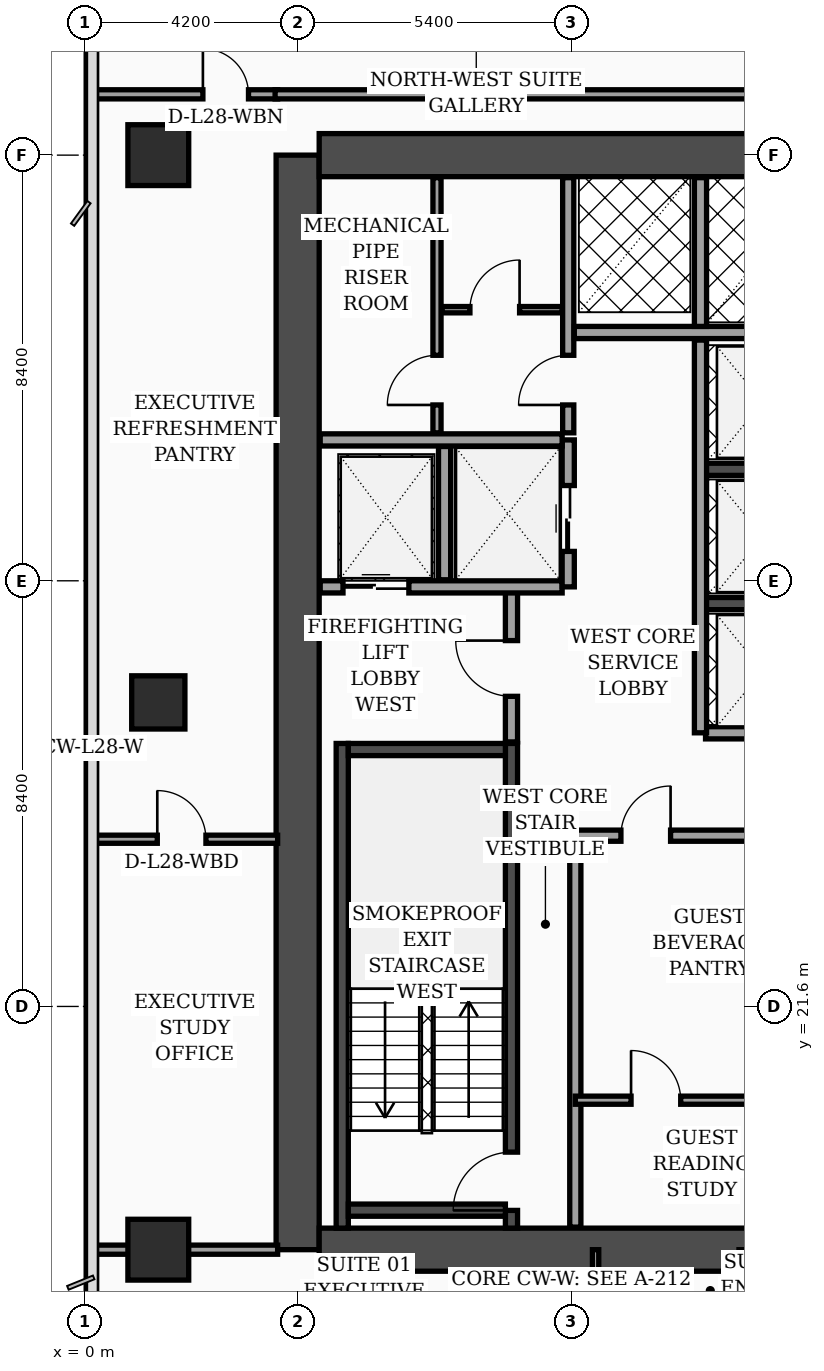
"""IFC4 building model, lengths in metres.
Left out: names, types, materials, properties, quantities, classifications, styles, units other than length and angle.
Written with IfcOpenShell. Run it as: python <this file> out.ifc"""

import sys

from ifc_helpers import new_model, si_unit, direction, frame, frame_2d, origin, origin_2d, place, context, subcontext, project, spatial, rectangle, extrude, element, fill, save


model = new_model("IFC4")
c1 = context("Model", 3, precision=1e-05, world=origin(), true_north=direction((0.0, 1.0)))
c2 = subcontext(c1, "Body", "Model", "MODEL_VIEW")
j1 = project(units=[si_unit("LENGTHUNIT", "METRE"), si_unit("PLANEANGLEUNIT", "RADIAN")], contexts=[c1])
p1 = place(None, origin())
s1 = spatial("IfcSite", under=j1, at=p1, CompositionType="ELEMENT")
p2 = place(p1, origin())
s2 = spatial("IfcBuilding", under=s1, at=p2, CompositionType="ELEMENT")
p3 = place(p2, frame((0.0, 0.0, 116.4)))
s3 = spatial("IfcBuildingStorey", under=s2, at=p3, CompositionType="ELEMENT", Elevation=116.4)
p4 = place(p3, frame((4.2, 16.8, 0.0), z_axis=(0.0, 0.0, 1.0), x_axis=(0.0, 1.0, 0.0)))
e1 = element("IfcWall", 1, at=p4, inside=s3, PredefinedType="SHEAR", context=c2, shape_type="SweptSolid", body=[
    extrude(rectangle(XDim=21.6, YDim=0.85, at=frame_2d((10.8, 0.0))), origin(), (0.0, 0.0, 1.0), 3.56),
])
for number, where, z_axis, x_axis in (
    (2, (4.625, 38.4, 0.0), (0.0, 0.0, 1.0), (1.0, 0.0, 0.0)),
    (3, (4.625, 16.8, 0.0), (0.0, 0.0, 1.0), (1.0, 0.0, 0.0)),
):
    element("IfcWall", number, at=place(p3, frame(where, z_axis=z_axis, x_axis=x_axis)), inside=s3, PredefinedType="SHEAR", context=c2, shape_type="SweptSolid", body=[
        extrude(rectangle(XDim=9.95, YDim=0.85, at=frame_2d((4.975, 0.0))), origin(), (0.0, 0.0, 1.0), 3.56),
    ])
p5 = place(p3, frame((5.08, 17.225, 0.0), z_axis=(0.0, 0.0, 1.0), x_axis=(0.0, 1.0, 0.0)))
e4 = element("IfcWall", 4, at=p5, inside=s3, PredefinedType="SOLIDWALL", context=c2, shape_type="SweptSolid", body=[
    extrude(rectangle(XDim=9.565, YDim=0.24, at=frame_2d((4.782, 0.0))), origin(), (0.0, 0.0, 1.0), 3.56),
])
p6 = place(p3, frame((8.42, 17.225, 0.0), z_axis=(0.0, 0.0, 1.0), x_axis=(0.0, 1.0, 0.0)))
e5 = element("IfcWall", 5, at=p6, inside=s3, PredefinedType="SOLIDWALL", context=c2, shape_type="SweptSolid", body=[
    extrude(rectangle(XDim=9.565, YDim=0.24, at=frame_2d((4.782, 0.0))), origin(), (0.0, 0.0, 1.0), 3.56),
])
p7 = place(p6, frame((0.35, 0.0, 0.0)))
e6 = element("IfcOpeningElement", 6, at=p7, cuts=e5, PredefinedType="OPENING", context=c2, shape_type="SweptSolid", body=[
    extrude(rectangle(XDim=1.15, YDim=2.2, at=frame_2d((0.575, 1.1))), frame((0.0, 0.13, 0.0), z_axis=(0.0, -1.0, 0.0), x_axis=(1.0, 0.0, 0.0)), (0.0, 0.0, 1.0), 0.26),
])
for number, where, z_axis, x_axis in (
    (7, (5.2, 17.58, 0.0), (0.0, 0.0, 1.0), (1.0, 0.0, 0.0)),
    (8, (5.2, 26.67, 0.0), (0.0, 0.0, 1.0), (1.0, 0.0, 0.0)),
):
    element("IfcWall", number, at=place(p3, frame(where, z_axis=z_axis, x_axis=x_axis)), inside=s3, PredefinedType="SOLIDWALL", context=c2, shape_type="SweptSolid", body=[
        extrude(rectangle(XDim=3.1, YDim=0.24, at=frame_2d((1.55, 0.0))), origin(), (0.0, 0.0, 1.0), 3.56),
    ])
for number, where, z_axis, x_axis in (
    (9, (12.18, 29.55, 0.0), (0.0, 0.0, 1.0), (1.0, 0.0, 0.0)),
    (10, (12.18, 32.2, 0.0), (0.0, 0.0, 1.0), (1.0, 0.0, 0.0)),
):
    element("IfcWall", number, at=place(p3, frame(where, z_axis=z_axis, x_axis=x_axis)), inside=s3, PredefinedType="SOLIDWALL", context=c2, shape_type="SweptSolid", body=[
        extrude(rectangle(XDim=2.395, YDim=0.24, at=frame_2d((1.198, 0.0))), origin(), (0.0, 0.0, 1.0), 3.56),
    ])
p8 = place(p3, frame((1.45, 16.8, 0.0), z_axis=(0.0, 0.0, 1.0), x_axis=(1.0, 0.0, 0.0)))
e11 = element("IfcColumn", 11, at=p8, inside=s3, PredefinedType="COLUMN", context=c2, shape_type="SweptSolid", body=[
    extrude(rectangle(XDim=1.2, YDim=1.2, at=origin_2d()), origin(), (0.0, 0.0, 1.0), 3.56),
])
p9 = place(p3, frame((1.45, 27.6, 0.0), z_axis=(0.0, 0.0, 1.0), x_axis=(1.0, 0.0, 0.0)))
e12 = element("IfcColumn", 12, at=p9, inside=s3, PredefinedType="COLUMN", context=c2, shape_type="SweptSolid", body=[
    extrude(rectangle(XDim=1.05, YDim=1.05, at=origin_2d()), origin(), (0.0, 0.0, 1.0), 3.56),
])
p10 = place(p3, frame((1.45, 38.4, 0.0), z_axis=(0.0, 0.0, 1.0), x_axis=(1.0, 0.0, 0.0)))
e13 = element("IfcColumn", 13, at=p10, inside=s3, PredefinedType="COLUMN", context=c2, shape_type="SweptSolid", body=[
    extrude(rectangle(XDim=1.2, YDim=1.2, at=origin_2d()), origin(), (0.0, 0.0, 1.0), 3.56),
])
p11 = place(p3, frame((8.42, 26.82, 0.0), z_axis=(0.0, 0.0, 1.0), x_axis=(0.0, 1.0, 0.0)))
e14 = element("IfcWall", 14, at=p11, inside=s3, PredefinedType="SOLIDWALL", context=c2, shape_type="SweptSolid", body=[
    extrude(rectangle(XDim=3.0, YDim=0.24, at=frame_2d((1.5, 0.0))), origin(), (0.0, 0.0, 1.0), 3.56),
])
p12 = place(p11, frame((0.9, 0.0, 0.0)))
e15 = element("IfcOpeningElement", 15, at=p12, cuts=e14, PredefinedType="OPENING", context=c2, shape_type="SweptSolid", body=[
    extrude(rectangle(XDim=1.1, YDim=2.2, at=frame_2d((0.55, 1.1))), frame((0.0, 0.13, 0.0), z_axis=(0.0, -1.0, 0.0), x_axis=(1.0, 0.0, 0.0)), (0.0, 0.0, 1.0), 0.26),
])
p13 = place(p3, frame((4.645, 29.88, 0.0), z_axis=(0.0, 0.0, 1.0), x_axis=(1.0, 0.0, 0.0)))
e16 = element("IfcWall", 16, at=p13, inside=s3, PredefinedType="SOLIDWALL", context=c2, shape_type="SweptSolid", body=[
    extrude(rectangle(XDim=4.775, YDim=0.24, at=frame_2d((2.387, 0.0))), origin(), (0.0, 0.0, 1.0), 3.56),
])
p14 = place(p13, frame((0.45, 0.0, 0.0)))
e17 = element("IfcOpeningElement", 17, at=p14, cuts=e16, PredefinedType="OPENING", context=c2, shape_type="SweptSolid", body=[
    extrude(rectangle(XDim=1.3, YDim=2.35, at=frame_2d((0.65, 1.175))), frame((0.0, 0.13, 0.0), z_axis=(0.0, -1.0, 0.0), x_axis=(1.0, 0.0, 0.0)), (0.0, 0.0, 1.0), 0.26),
])
p15 = place(p3, frame((7.1, 30.02, 0.0), z_axis=(0.0, 0.0, 1.0), x_axis=(0.0, 1.0, 0.0)))
e18 = element("IfcWall", 18, at=p15, inside=s3, PredefinedType="SOLIDWALL", context=c2, shape_type="SweptSolid", body=[
    extrude(rectangle(XDim=2.63, YDim=0.24, at=frame_2d((1.315, 0.0))), origin(), (0.0, 0.0, 1.0), 3.56),
])
p16 = place(p3, frame((9.54, 29.88, 0.0), z_axis=(0.0, 0.0, 1.0), x_axis=(0.0, 1.0, 0.0)))
e19 = element("IfcWall", 19, at=p16, inside=s3, PredefinedType="SOLIDWALL", context=c2, shape_type="SweptSolid", body=[
    extrude(rectangle(XDim=2.9, YDim=0.24, at=frame_2d((1.45, 0.0))), origin(), (0.0, 0.0, 1.0), 3.56),
])
p17 = place(p16, frame((0.7, 0.0, 0.0)))
e20 = element("IfcOpeningElement", 20, at=p17, cuts=e19, PredefinedType="OPENING", context=c2, shape_type="SweptSolid", body=[
    extrude(rectangle(XDim=1.3, YDim=2.35, at=frame_2d((0.65, 1.175))), frame((0.0, 0.13, 0.0), z_axis=(0.0, -1.0, 0.0), x_axis=(1.0, 0.0, 0.0)), (0.0, 0.0, 1.0), 0.26),
])
p18 = place(p3, frame((4.645, 32.78, 0.0), z_axis=(0.0, 0.0, 1.0), x_axis=(1.0, 0.0, 0.0)))
e21 = element("IfcWall", 21, at=p18, inside=s3, PredefinedType="SOLIDWALL", context=c2, shape_type="SweptSolid", body=[
    extrude(rectangle(XDim=4.775, YDim=0.24, at=frame_2d((2.387, 0.0))), origin(), (0.0, 0.0, 1.0), 3.19),
])
p19 = place(p3, frame((9.68, 17.245, 0.0), z_axis=(0.0, 0.0, 1.0), x_axis=(0.0, 1.0, 0.0)))
e22 = element("IfcWall", 22, at=p19, inside=s3, PredefinedType="SOLIDWALL", context=c2, shape_type="SweptSolid", body=[
    extrude(rectangle(XDim=7.755, YDim=0.22, at=frame_2d((3.877, 0.0))), origin(), (0.0, 0.0, 1.0), 3.56),
])
p20 = place(p3, frame((6.95, 32.92, 0.0), z_axis=(0.0, 0.0, 1.0), x_axis=(0.0, 1.0, 0.0)))
e23 = element("IfcWall", 23, at=p20, inside=s3, PredefinedType="PARTITIONING", context=c2, shape_type="SweptSolid", body=[
    extrude(rectangle(XDim=5.035, YDim=0.16, at=frame_2d((2.518, 0.0))), origin(), (0.0, 0.0, 1.0), 3.56),
])
p21 = place(p20, frame((0.55, 0.0, 0.0)))
e24 = element("IfcOpeningElement", 24, at=p21, cuts=e23, PredefinedType="OPENING", context=c2, shape_type="SweptSolid", body=[
    extrude(rectangle(XDim=0.98, YDim=2.15, at=frame_2d((0.49, 1.075))), frame((0.0, 0.09, 0.0), z_axis=(0.0, -1.0, 0.0), x_axis=(1.0, 0.0, 0.0)), (0.0, 0.0, 1.0), 0.18),
])
p22 = place(p3, frame((7.05, 35.35, 0.0), z_axis=(0.0, 0.0, 1.0), x_axis=(1.0, 0.0, 0.0)))
e25 = element("IfcWall", 25, at=p22, inside=s3, PredefinedType="PARTITIONING", context=c2, shape_type="SweptSolid", body=[
    extrude(rectangle(XDim=2.37, YDim=0.125, at=frame_2d((1.185, 0.0))), origin(), (0.0, 0.0, 1.0), 3.56),
])
p23 = place(p22, frame((0.55, 0.0, 0.0)))
e26 = element("IfcOpeningElement", 26, at=p23, cuts=e25, PredefinedType="OPENING", context=c2, shape_type="SweptSolid", body=[
    extrude(rectangle(XDim=0.98, YDim=2.15, at=frame_2d((0.49, 1.075))), frame((0.0, 0.073, 0.0), z_axis=(0.0, -1.0, 0.0), x_axis=(1.0, 0.0, 0.0)), (0.0, 0.0, 1.0), 0.145),
])
p24 = place(p3, frame((9.54, 32.92, 0.0), z_axis=(0.0, 0.0, 1.0), x_axis=(0.0, 1.0, 0.0)))
e27 = element("IfcWall", 27, at=p24, inside=s3, PredefinedType="SOLIDWALL", context=c2, shape_type="SweptSolid", body=[
    extrude(rectangle(XDim=5.035, YDim=0.22, at=frame_2d((2.518, 0.0))), origin(), (0.0, 0.0, 1.0), 3.56),
])
p25 = place(p24, frame((0.55, 0.0, 0.0)))
e28 = element("IfcOpeningElement", 28, at=p25, cuts=e27, PredefinedType="OPENING", context=c2, shape_type="SweptSolid", body=[
    extrude(rectangle(XDim=0.98, YDim=2.15, at=frame_2d((0.49, 1.075))), frame((0.0, 0.12, 0.0), z_axis=(0.0, -1.0, 0.0), x_axis=(1.0, 0.0, 0.0)), (0.0, 0.0, 1.0), 0.24),
])
p26 = place(p3, frame((9.68, 19.75, 0.0), z_axis=(0.0, 0.0, 1.0), x_axis=(1.0, 0.0, 0.0)))
e29 = element("IfcWall", 29, at=p26, inside=s3, PredefinedType="PARTITIONING", context=c2, shape_type="SweptSolid", body=[
    extrude(rectangle(XDim=4.875, YDim=0.16, at=frame_2d((2.438, 0.0))), origin(), (0.0, 0.0, 1.0), 3.56),
])
p27 = place(p26, frame((1.1, 0.0, 0.0)))
e30 = element("IfcOpeningElement", 30, at=p27, cuts=e29, PredefinedType="OPENING", context=c2, shape_type="SweptSolid", body=[
    extrude(rectangle(XDim=0.98, YDim=2.15, at=frame_2d((0.49, 1.075))), frame((0.0, 0.09, 0.0), z_axis=(0.0, -1.0, 0.0), x_axis=(1.0, 0.0, 0.0)), (0.0, 0.0, 1.0), 0.18),
])
p28 = place(p3, frame((9.68, 24.97, 0.0), z_axis=(0.0, 0.0, 1.0), x_axis=(1.0, 0.0, 0.0)))
e31 = element("IfcWall", 31, at=p28, inside=s3, PredefinedType="SOLIDWALL", context=c2, shape_type="SweptSolid", body=[
    extrude(rectangle(XDim=4.875, YDim=0.22, at=frame_2d((2.438, 0.0))), origin(), (0.0, 0.0, 1.0), 2.84),
])
p29 = place(p28, frame((0.9, 0.0, 0.0)))
e32 = element("IfcOpeningElement", 32, at=p29, cuts=e31, PredefinedType="OPENING", context=c2, shape_type="SweptSolid", body=[
    extrude(rectangle(XDim=0.98, YDim=2.15, at=frame_2d((0.49, 1.075))), frame((0.0, 0.12, 0.0), z_axis=(0.0, -1.0, 0.0), x_axis=(1.0, 0.0, 0.0)), (0.0, 0.0, 1.0), 0.24),
])
p30 = place(p3, frame((12.25, 27.0, 0.0), z_axis=(0.0, 0.0, 1.0), x_axis=(1.0, 0.0, 0.0)))
e33 = element("IfcWall", 33, at=p30, inside=s3, PredefinedType="SOLIDWALL", context=c2, shape_type="SweptSolid", body=[
    extrude(rectangle(XDim=2.305, YDim=0.24, at=frame_2d((1.152, 0.0))), origin(), (0.0, 0.0, 1.0), 3.56),
])
p31 = place(p3, frame((12.15, 27.0, 0.0), z_axis=(0.0, 0.0, 1.0), x_axis=(0.0, 1.0, 0.0)))
e34 = element("IfcWall", 34, at=p31, inside=s3, PredefinedType="SOLIDWALL", context=c2, shape_type="SweptSolid", body=[
    extrude(rectangle(XDim=7.75, YDim=0.24, at=frame_2d((3.875, 0.0))), origin(), (0.0, 0.0, 1.0), 3.56),
])
p32 = place(p3, frame((9.66, 34.9, 0.0), z_axis=(0.0, 0.0, 1.0), x_axis=(1.0, 0.0, 0.0)))
e35 = element("IfcWall", 35, at=p32, inside=s3, PredefinedType="SOLIDWALL", context=c2, shape_type="SweptSolid", body=[
    extrude(rectangle(XDim=4.895, YDim=0.24, at=frame_2d((2.448, 0.0))), origin(), (0.0, 0.0, 1.0), 3.56),
])
p33 = place(p3, frame((12.15, 35.02, 0.0), z_axis=(0.0, 0.0, 1.0), x_axis=(0.0, 1.0, 0.0)))
e36 = element("IfcWall", 36, at=p33, inside=s3, PredefinedType="SOLIDWALL", context=c2, shape_type="SweptSolid", body=[
    extrude(rectangle(XDim=2.935, YDim=0.24, at=frame_2d((1.468, 0.0))), origin(), (0.0, 0.0, 1.0), 3.56),
])
p34 = place(p3, frame((0.08, 24.9, 0.0), z_axis=(0.0, 0.0, 1.0), x_axis=(1.0, 0.0, 0.0)))
e37 = element("IfcWall", 37, at=p34, inside=s3, PredefinedType="PARTITIONING", context=c2, shape_type="SweptSolid", body=[
    extrude(rectangle(XDim=3.725, YDim=0.16, at=frame_2d((1.862, 0.0))), origin(), (0.0, 0.0, 1.0), 3.04),
])
p35 = place(p34, frame((1.35, 0.0, 0.0)))
e38 = element("IfcOpeningElement", 38, at=p35, cuts=e37, PredefinedType="OPENING", context=c2, shape_type="SweptSolid", body=[
    extrude(rectangle(XDim=0.96, YDim=2.2, at=frame_2d((0.48, 1.1))), frame((0.0, 0.09, 0.0), z_axis=(0.0, -1.0, 0.0), x_axis=(1.0, 0.0, 0.0)), (0.0, 0.0, 1.0), 0.18),
])
p36 = place(p3, frame((0.08, 16.8, 0.0), z_axis=(0.0, 0.0, 1.0), x_axis=(1.0, 0.0, 0.0)))
e39 = element("IfcWall", 39, at=p36, inside=s3, PredefinedType="PARTITIONING", context=c2, shape_type="SweptSolid", body=[
    extrude(rectangle(XDim=3.725, YDim=0.18, at=frame_2d((1.862, 0.0))), origin(), (0.0, 0.0, 1.0), 2.84),
])
p37 = place(p3, frame((0.08, 39.6, 0.0), z_axis=(0.0, 0.0, 1.0), x_axis=(1.0, 0.0, 0.0)))
e40 = element("IfcWall", 40, at=p37, inside=s3, PredefinedType="PARTITIONING", context=c2, shape_type="SweptSolid", body=[
    extrude(rectangle(XDim=3.725, YDim=0.18, at=frame_2d((1.862, 0.0))), origin(), (0.0, 0.0, 1.0), 2.84),
])
p38 = place(p37, frame((2.25, 0.0, 0.0)))
e41 = element("IfcOpeningElement", 41, at=p38, cuts=e40, PredefinedType="OPENING", context=c2, shape_type="SweptSolid", body=[
    extrude(rectangle(XDim=0.9, YDim=2.15, at=frame_2d((0.45, 1.075))), frame((0.0, 0.1, 0.0), z_axis=(0.0, -1.0, 0.0), x_axis=(1.0, 0.0, 0.0)), (0.0, 0.0, 1.0), 0.2),
])
p39 = place(p3, frame((10.08, 14.55, 0.0), z_axis=(0.0, 0.0, 1.0), x_axis=(0.0, 1.0, 0.0)))
e42 = element("IfcWall", 42, at=p39, inside=s3, PredefinedType="PARTITIONING", context=c2, shape_type="SweptSolid", body=[
    extrude(rectangle(XDim=2.25, YDim=0.125, at=frame_2d((1.125, 0.0))), origin(), (0.0, 0.0, 1.0), 3.56),
])
p40 = place(p3, frame((13.0, 2.44, 0.0), z_axis=(0.0, 0.0, 1.0), x_axis=(0.0, 1.0, 0.0)))
e43 = element("IfcWall", 43, at=p40, inside=s3, PredefinedType="PARTITIONING", context=c2, shape_type="SweptSolid", body=[
    extrude(rectangle(XDim=14.36, YDim=0.18, at=frame_2d((7.18, 0.0))), origin(), (0.0, 0.0, 1.0), 2.84),
])
p41 = place(p40, frame((3.01, 0.0, 0.0)))
e44 = element("IfcOpeningElement", 44, at=p41, cuts=e43, PredefinedType="OPENING", context=c2, shape_type="SweptSolid", body=[
    extrude(rectangle(XDim=1.02, YDim=2.2, at=frame_2d((0.51, 1.1))), frame((0.0, 0.1, 0.0), z_axis=(0.0, -1.0, 0.0), x_axis=(1.0, 0.0, 0.0)), (0.0, 0.0, 1.0), 0.2),
])
p42 = place(p3, frame((3.755, 39.6, 0.0), z_axis=(0.0, 0.0, 1.0), x_axis=(1.0, 0.0, 0.0)))
e45 = element("IfcWall", 45, at=p42, inside=s3, PredefinedType="PARTITIONING", context=c2, shape_type="SweptSolid", body=[
    extrude(rectangle(XDim=11.395, YDim=0.18, at=frame_2d((5.698, 0.0))), origin(), (0.0, 0.0, 1.0), 2.84),
])
p43 = place(p12, origin())
e46 = element("IfcDoor", 46, at=p43, inside=s3, OperationType="SINGLE_SWING_RIGHT", PredefinedType="DOOR", context=c2, shape_type="SweptSolid", body=[
    extrude(rectangle(XDim=1.1, YDim=2.2, at=frame_2d((0.55, 1.1))), frame((0.0, 0.025, 0.0), z_axis=(0.0, -1.0, 0.0), x_axis=(1.0, 0.0, 0.0)), (0.0, 0.0, 1.0), 0.05),
])
fill(e15, e46)
p44 = place(p14, origin())
e47 = element("IfcDoor", 47, at=p44, inside=s3, OperationType="DOUBLE_DOOR_SLIDING", PredefinedType="DOOR", context=c2, shape_type="SweptSolid", body=[
    extrude(rectangle(XDim=1.3, YDim=2.35, at=frame_2d((0.65, 1.175))), frame((0.0, 0.025, 0.0), z_axis=(0.0, -1.0, 0.0), x_axis=(1.0, 0.0, 0.0)), (0.0, 0.0, 1.0), 0.05),
])
fill(e17, e47)
p45 = place(p17, origin())
e48 = element("IfcDoor", 48, at=p45, inside=s3, OperationType="DOUBLE_DOOR_SLIDING", PredefinedType="DOOR", context=c2, shape_type="SweptSolid", body=[
    extrude(rectangle(XDim=1.3, YDim=2.35, at=frame_2d((0.65, 1.175))), frame((0.0, 0.025, 0.0), z_axis=(0.0, -1.0, 0.0), x_axis=(1.0, 0.0, 0.0)), (0.0, 0.0, 1.0), 0.05),
])
fill(e20, e48)
p46 = place(p21, origin())
e49 = element("IfcDoor", 49, at=p46, inside=s3, OperationType="SINGLE_SWING_LEFT", PredefinedType="DOOR", context=c2, shape_type="SweptSolid", body=[
    extrude(rectangle(XDim=0.98, YDim=2.15, at=frame_2d((0.49, 1.075))), frame((0.0, 0.025, 0.0), z_axis=(0.0, -1.0, 0.0), x_axis=(1.0, 0.0, 0.0)), (0.0, 0.0, 1.0), 0.05),
])
fill(e24, e49)
p47 = place(p23, origin())
e50 = element("IfcDoor", 50, at=p47, inside=s3, OperationType="SINGLE_SWING_RIGHT", PredefinedType="DOOR", context=c2, shape_type="SweptSolid", body=[
    extrude(rectangle(XDim=0.98, YDim=2.15, at=frame_2d((0.49, 1.075))), frame((0.0, 0.025, 0.0), z_axis=(0.0, -1.0, 0.0), x_axis=(1.0, 0.0, 0.0)), (0.0, 0.0, 1.0), 0.05),
])
fill(e26, e50)
p48 = place(p25, origin())
e51 = element("IfcDoor", 51, at=p48, inside=s3, OperationType="SINGLE_SWING_LEFT", PredefinedType="DOOR", context=c2, shape_type="SweptSolid", body=[
    extrude(rectangle(XDim=0.98, YDim=2.15, at=frame_2d((0.49, 1.075))), frame((0.0, 0.025, 0.0), z_axis=(0.0, -1.0, 0.0), x_axis=(1.0, 0.0, 0.0)), (0.0, 0.0, 1.0), 0.05),
])
fill(e28, e51)
p49 = place(p27, origin())
e52 = element("IfcDoor", 52, at=p49, inside=s3, OperationType="SINGLE_SWING_LEFT", PredefinedType="DOOR", context=c2, shape_type="SweptSolid", body=[
    extrude(rectangle(XDim=0.98, YDim=2.15, at=frame_2d((0.49, 1.075))), frame((0.0, 0.025, 0.0), z_axis=(0.0, -1.0, 0.0), x_axis=(1.0, 0.0, 0.0)), (0.0, 0.0, 1.0), 0.05),
])
fill(e30, e52)
p50 = place(p29, origin())
e53 = element("IfcDoor", 53, at=p50, inside=s3, OperationType="SINGLE_SWING_RIGHT", PredefinedType="DOOR", context=c2, shape_type="SweptSolid", body=[
    extrude(rectangle(XDim=0.98, YDim=2.15, at=frame_2d((0.49, 1.075))), frame((0.0, 0.025, 0.0), z_axis=(0.0, -1.0, 0.0), x_axis=(1.0, 0.0, 0.0)), (0.0, 0.0, 1.0), 0.05),
])
fill(e32, e53)
p51 = place(p35, origin())
e54 = element("IfcDoor", 54, at=p51, inside=s3, OperationType="SINGLE_SWING_LEFT", PredefinedType="DOOR", context=c2, shape_type="SweptSolid", body=[
    extrude(rectangle(XDim=0.96, YDim=2.2, at=frame_2d((0.48, 1.1))), frame((0.0, 0.025, 0.0), z_axis=(0.0, -1.0, 0.0), x_axis=(1.0, 0.0, 0.0)), (0.0, 0.0, 1.0), 0.05),
])
fill(e38, e54)
p52 = place(p38, origin())
e55 = element("IfcDoor", 55, at=p52, inside=s3, OperationType="SINGLE_SWING_LEFT", PredefinedType="DOOR", context=c2, shape_type="SweptSolid", body=[
    extrude(rectangle(XDim=0.9, YDim=2.15, at=frame_2d((0.45, 1.075))), frame((0.0, 0.025, 0.0), z_axis=(0.0, -1.0, 0.0), x_axis=(1.0, 0.0, 0.0)), (0.0, 0.0, 1.0), 0.05),
])
fill(e41, e55)
p53 = place(p7, origin())
e56 = element("IfcDoor", 56, at=p53, inside=s3, OperationType="SINGLE_SWING_LEFT", PredefinedType="DOOR", context=c2, shape_type="SweptSolid", body=[
    extrude(rectangle(XDim=1.15, YDim=2.2, at=frame_2d((0.575, 1.1))), frame((0.0, 0.025, 0.0), z_axis=(0.0, -1.0, 0.0), x_axis=(1.0, 0.0, 0.0)), (0.0, 0.0, 1.0), 0.05),
])
fill(e6, e56)
save(model, sys.argv[1])
